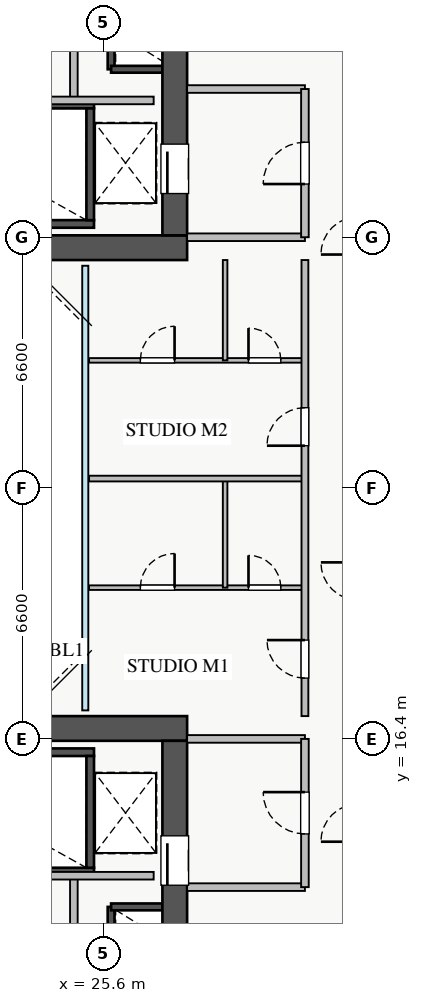
"""IFC4 building model, lengths in metres.
Left out: names, types, materials, properties, quantities, classifications, styles, units other than length and angle.
Written with IfcOpenShell. Run it as: python <this file> out.ifc"""

import sys

from ifc_helpers import new_model, si_unit, direction, frame, frame_2d, origin, place, context, subcontext, project, spatial, rectangle, extrude, source, transform, mapped, element, fill, save


model = new_model("IFC4")
c1 = context("Model", 3, precision=1e-05, world=origin(), true_north=direction((0.0, 1.0)))
c2 = subcontext(c1, "Body", "Model", "MODEL_VIEW")
j1 = project(units=[si_unit("LENGTHUNIT", "METRE"), si_unit("PLANEANGLEUNIT", "RADIAN")], contexts=[c1])
p1 = place(None, origin())
s1 = spatial("IfcSite", under=j1, at=p1, CompositionType="ELEMENT")
p2 = place(p1, origin())
s2 = spatial("IfcBuilding", under=s1, at=p2, CompositionType="ELEMENT")
p3 = place(p2, frame((0.0, 0.0, 110.0)))
s3 = spatial("IfcBuildingStorey", under=s2, at=p3, CompositionType="ELEMENT", Elevation=110.0)
p4 = place(p3, frame((25.8, 34.02, 0.0), z_axis=(0.0, 0.0, 1.0), x_axis=(0.0, 1.0, 0.0)))
e1 = element("IfcWall", 1, at=p4, inside=s3, PredefinedType="SHEAR", context=c2, shape_type="SweptSolid", body=[
    extrude(rectangle(XDim=1.06, YDim=0.18, at=frame_2d((0.53, 0.0))), origin(), (0.0, 0.0, 1.0), 3.07),
])
p5 = place(p3, frame((25.8, 34.02, 0.0), z_axis=(0.0, 0.0, 1.0), x_axis=(1.0, 0.0, 0.0)))
e2 = element("IfcWall", 2, at=p5, inside=s3, PredefinedType="SHEAR", context=c2, shape_type="SweptSolid", body=[
    extrude(rectangle(XDim=1.35, YDim=0.18, at=frame_2d((0.675, 0.0))), origin(), (0.0, 0.0, 1.0), 3.07),
])
p6 = place(p3, frame((25.8, 10.92, 0.0), z_axis=(0.0, 0.0, 1.0), x_axis=(0.0, 1.0, 0.0)))
e3 = element("IfcWall", 3, at=p6, inside=s3, PredefinedType="SHEAR", context=c2, shape_type="SweptSolid", body=[
    extrude(rectangle(XDim=1.06, YDim=0.18, at=frame_2d((0.53, 0.0))), origin(), (0.0, 0.0, 1.0), 3.07),
])
p7 = place(p3, frame((25.8, 11.98, 0.0), z_axis=(0.0, 0.0, 1.0), x_axis=(1.0, 0.0, 0.0)))
e4 = element("IfcWall", 4, at=p7, inside=s3, PredefinedType="SHEAR", context=c2, shape_type="SweptSolid", body=[
    extrude(rectangle(XDim=1.35, YDim=0.18, at=frame_2d((0.675, 0.0))), origin(), (0.0, 0.0, 1.0), 3.07),
])
p8 = place(p3, frame((18.2, 29.95, 0.0), z_axis=(0.0, 0.0, 1.0), x_axis=(1.0, 0.0, 0.0)))
e5 = element("IfcWall", 5, at=p8, inside=s3, PredefinedType="SHEAR", context=c2, shape_type="SweptSolid", body=[
    extrude(rectangle(XDim=7.15, YDim=0.2, at=frame_2d((3.575, 0.0))), origin(), (0.0, 0.0, 1.0), 3.25),
])
p9 = place(p3, frame((18.2, 33.09, 0.0), z_axis=(0.0, 0.0, 1.0), x_axis=(1.0, 0.0, 0.0)))
e6 = element("IfcWall", 6, at=p9, inside=s3, PredefinedType="SHEAR", context=c2, shape_type="SweptSolid", body=[
    extrude(rectangle(XDim=7.15, YDim=0.2, at=frame_2d((3.575, 0.0))), origin(), (0.0, 0.0, 1.0), 3.25),
])
p10 = place(p9, frame((0.35, 0.0, 0.0)))
e7 = element("IfcOpeningElement", 7, at=p10, cuts=e6, PredefinedType="OPENING", context=c2, shape_type="SweptSolid", body=[
    extrude(rectangle(XDim=1.1, YDim=2.05, at=frame_2d((0.55, 1.025))), frame((0.0, 0.11, 0.0), z_axis=(0.0, -1.0, 0.0), x_axis=(1.0, 0.0, 0.0)), (0.0, 0.0, 1.0), 0.22),
])
p11 = place(p3, frame((25.25, 30.05, 0.0), z_axis=(0.0, 0.0, 1.0), x_axis=(0.0, 1.0, 0.0)))
e8 = element("IfcWall", 8, at=p11, inside=s3, PredefinedType="SHEAR", context=c2, shape_type="SweptSolid", body=[
    extrude(rectangle(XDim=2.94, YDim=0.2, at=frame_2d((1.47, 0.0))), origin(), (0.0, 0.0, 1.0), 3.25),
])
p12 = place(p3, frame((18.2, 12.91, 0.0), z_axis=(0.0, 0.0, 1.0), x_axis=(1.0, 0.0, 0.0)))
e9 = element("IfcWall", 9, at=p12, inside=s3, PredefinedType="SHEAR", context=c2, shape_type="SweptSolid", body=[
    extrude(rectangle(XDim=7.15, YDim=0.2, at=frame_2d((3.575, 0.0))), origin(), (0.0, 0.0, 1.0), 3.25),
])
p13 = place(p12, frame((0.35, 0.0, 0.0)))
e10 = element("IfcOpeningElement", 10, at=p13, cuts=e9, PredefinedType="OPENING", context=c2, shape_type="SweptSolid", body=[
    extrude(rectangle(XDim=1.1, YDim=2.05, at=frame_2d((0.55, 1.025))), frame((0.0, 0.11, 0.0), z_axis=(0.0, -1.0, 0.0), x_axis=(1.0, 0.0, 0.0)), (0.0, 0.0, 1.0), 0.22),
])
p14 = place(p3, frame((18.2, 16.05, 0.0), z_axis=(0.0, 0.0, 1.0), x_axis=(1.0, 0.0, 0.0)))
e11 = element("IfcWall", 11, at=p14, inside=s3, PredefinedType="SHEAR", context=c2, shape_type="SweptSolid", body=[
    extrude(rectangle(XDim=7.15, YDim=0.2, at=frame_2d((3.575, 0.0))), origin(), (0.0, 0.0, 1.0), 3.25),
])
p15 = place(p3, frame((25.25, 13.01, 0.0), z_axis=(0.0, 0.0, 1.0), x_axis=(0.0, 1.0, 0.0)))
e12 = element("IfcWall", 12, at=p15, inside=s3, PredefinedType="SHEAR", context=c2, shape_type="SweptSolid", body=[
    extrude(rectangle(XDim=2.94, YDim=0.2, at=frame_2d((1.47, 0.0))), origin(), (0.0, 0.0, 1.0), 3.25),
])
p16 = place(p3, frame((10.2, 29.325, 0.0), z_axis=(0.0, 0.0, 1.0), x_axis=(1.0, 0.0, 0.0)))
e13 = element("IfcWall", 13, at=p16, inside=s3, PredefinedType="SHEAR", context=c2, shape_type="SweptSolid", body=[
    extrude(rectangle(XDim=17.6, YDim=0.65, at=frame_2d((8.8, 0.0))), origin(), (0.0, 0.0, 1.0), 3.25),
])
p17 = place(p3, frame((27.475, 29.65, 0.0), z_axis=(0.0, 0.0, 1.0), x_axis=(0.0, 1.0, 0.0)))
e14 = element("IfcWall", 14, at=p17, inside=s3, PredefinedType="SHEAR", context=c2, shape_type="SweptSolid", body=[
    extrude(rectangle(XDim=5.9, YDim=0.65, at=frame_2d((2.95, 0.0))), origin(), (0.0, 0.0, 1.0), 3.25),
])
p18 = place(p17, frame((1.1, 0.0, 0.0)))
e15 = element("IfcOpeningElement", 15, at=p18, cuts=e14, PredefinedType="OPENING", context=c2, shape_type="SweptSolid", body=[
    extrude(rectangle(XDim=1.3, YDim=2.05, at=frame_2d((0.65, 1.025))), frame((0.0, 0.335, 0.0), z_axis=(0.0, -1.0, 0.0), x_axis=(1.0, 0.0, 0.0)), (0.0, 0.0, 1.0), 0.67),
])
p19 = place(p3, frame((10.2, 16.675, 0.0), z_axis=(0.0, 0.0, 1.0), x_axis=(1.0, 0.0, 0.0)))
e16 = element("IfcWall", 16, at=p19, inside=s3, PredefinedType="SHEAR", context=c2, shape_type="SweptSolid", body=[
    extrude(rectangle(XDim=17.6, YDim=0.65, at=frame_2d((8.8, 0.0))), origin(), (0.0, 0.0, 1.0), 3.25),
])
p20 = place(p3, frame((27.475, 10.45, 0.0), z_axis=(0.0, 0.0, 1.0), x_axis=(0.0, 1.0, 0.0)))
e17 = element("IfcWall", 17, at=p20, inside=s3, PredefinedType="SHEAR", context=c2, shape_type="SweptSolid", body=[
    extrude(rectangle(XDim=5.9, YDim=0.65, at=frame_2d((2.95, 0.0))), origin(), (0.0, 0.0, 1.0), 3.25),
])
p21 = place(p20, frame((2.1, 0.0, 0.0)))
e18 = element("IfcOpeningElement", 18, at=p21, cuts=e17, PredefinedType="OPENING", context=c2, shape_type="SweptSolid", body=[
    extrude(rectangle(XDim=1.3, YDim=2.05, at=frame_2d((0.65, 1.025))), frame((0.0, 0.335, 0.0), z_axis=(0.0, -1.0, 0.0), x_axis=(1.0, 0.0, 0.0)), (0.0, 0.0, 1.0), 0.67),
])
for number, where, z_axis, x_axis in (
    (19, (27.8, 29.6, 0.0), (0.0, 0.0, 1.0), (1.0, 0.0, 0.0)),
    (20, (27.8, 33.5, 0.0), (0.0, 0.0, 1.0), (1.0, 0.0, 0.0)),
):
    element("IfcWall", number, at=place(p3, frame(where, z_axis=z_axis, x_axis=x_axis)), inside=s3, PredefinedType="PARTITIONING", context=c2, shape_type="SweptSolid", body=[
        extrude(rectangle(XDim=3.1, YDim=0.2, at=frame_2d((1.55, 0.0))), origin(), (0.0, 0.0, 1.0), 3.07),
    ])
p22 = place(p3, frame((30.9, 29.6, 0.0), z_axis=(0.0, 0.0, 1.0), x_axis=(0.0, 1.0, 0.0)))
e21 = element("IfcWall", 21, at=p22, inside=s3, PredefinedType="PARTITIONING", context=c2, shape_type="SweptSolid", body=[
    extrude(rectangle(XDim=3.9, YDim=0.2, at=frame_2d((1.95, 0.0))), origin(), (0.0, 0.0, 1.0), 3.07),
])
p23 = place(p22, frame((1.4, 0.0, 0.0)))
e22 = element("IfcOpeningElement", 22, at=p23, cuts=e21, PredefinedType="OPENING", context=c2, shape_type="SweptSolid", body=[
    extrude(rectangle(XDim=1.1, YDim=2.05, at=frame_2d((0.55, 1.025))), frame((0.0, 0.11, 0.0), z_axis=(0.0, -1.0, 0.0), x_axis=(1.0, 0.0, 0.0)), (0.0, 0.0, 1.0), 0.22),
])
for number, where, z_axis, x_axis in (
    (23, (27.8, 16.4, 0.0), (0.0, 0.0, 1.0), (1.0, 0.0, 0.0)),
    (24, (27.8, 12.5, 0.0), (0.0, 0.0, 1.0), (1.0, 0.0, 0.0)),
):
    element("IfcWall", number, at=place(p3, frame(where, z_axis=z_axis, x_axis=x_axis)), inside=s3, PredefinedType="PARTITIONING", context=c2, shape_type="SweptSolid", body=[
        extrude(rectangle(XDim=3.1, YDim=0.2, at=frame_2d((1.55, 0.0))), origin(), (0.0, 0.0, 1.0), 3.07),
    ])
p24 = place(p3, frame((30.9, 12.5, 0.0), z_axis=(0.0, 0.0, 1.0), x_axis=(0.0, 1.0, 0.0)))
e25 = element("IfcWall", 25, at=p24, inside=s3, PredefinedType="PARTITIONING", context=c2, shape_type="SweptSolid", body=[
    extrude(rectangle(XDim=3.9, YDim=0.2, at=frame_2d((1.95, 0.0))), origin(), (0.0, 0.0, 1.0), 3.07),
])
p25 = place(p24, frame((1.4, 0.0, 0.0)))
e26 = element("IfcOpeningElement", 26, at=p25, cuts=e25, PredefinedType="OPENING", context=c2, shape_type="SweptSolid", body=[
    extrude(rectangle(XDim=1.1, YDim=2.05, at=frame_2d((0.55, 1.025))), frame((0.0, 0.11, 0.0), z_axis=(0.0, -1.0, 0.0), x_axis=(1.0, 0.0, 0.0)), (0.0, 0.0, 1.0), 0.22),
])
for number, where, z_axis, x_axis in (
    (27, (24.82, 33.2, 0.0), (0.0, 0.0, 1.0), (0.0, 1.0, 0.0)),
    (28, (24.82, 10.15, 0.0), (0.0, 0.0, 1.0), (0.0, 1.0, 0.0)),
):
    element("IfcWall", number, at=place(p3, frame(where, z_axis=z_axis, x_axis=x_axis)), inside=s3, PredefinedType="PARTITIONING", context=c2, shape_type="SweptSolid", body=[
        extrude(rectangle(XDim=2.65, YDim=0.2, at=frame_2d((1.325, 0.0))), origin(), (0.0, 0.0, 1.0), 3.07),
    ])
for number, where, z_axis, x_axis in (
    (29, (21.75, 33.2, 0.0), (0.0, 0.0, 1.0), (1.0, 0.0, 0.0)),
    (30, (21.75, 12.8, 0.0), (0.0, 0.0, 1.0), (1.0, 0.0, 0.0)),
):
    element("IfcWall", number, at=place(p3, frame(where, z_axis=z_axis, x_axis=x_axis)), inside=s3, PredefinedType="PARTITIONING", context=c2, shape_type="SweptSolid", body=[
        extrude(rectangle(XDim=5.17, YDim=0.2, at=frame_2d((2.585, 0.0))), origin(), (0.0, 0.0, 1.0), 3.07),
    ])
p26 = place(p3, frame((25.22, 20.38, 0.0), z_axis=(0.0, 0.0, 1.0), x_axis=(1.0, 0.0, 0.0)))
e31 = element("IfcWall", 31, at=p26, inside=s3, PredefinedType="PLUMBINGWALL", context=c2, shape_type="SweptSolid", body=[
    extrude(rectangle(XDim=5.68, YDim=0.12, at=frame_2d((2.84, 0.0))), origin(), (0.0, 0.0, 1.0), 3.07),
])
p27 = place(p26, frame((1.35, 0.0, 0.0)))
e32 = element("IfcOpeningElement", 32, at=p27, cuts=e31, PredefinedType="OPENING", context=c2, shape_type="SweptSolid", body=[
    extrude(rectangle(XDim=0.9, YDim=2.05, at=frame_2d((0.45, 1.025))), frame((0.0, 0.07, 0.0), z_axis=(0.0, -1.0, 0.0), x_axis=(1.0, 0.0, 0.0)), (0.0, 0.0, 1.0), 0.14),
])
p28 = place(p26, frame((4.195, 0.0, 0.0)))
e33 = element("IfcOpeningElement", 33, at=p28, cuts=e31, PredefinedType="OPENING", context=c2, shape_type="SweptSolid", body=[
    extrude(rectangle(XDim=0.85, YDim=2.05, at=frame_2d((0.425, 1.025))), frame((0.0, 0.07, 0.0), z_axis=(0.0, -1.0, 0.0), x_axis=(1.0, 0.0, 0.0)), (0.0, 0.0, 1.0), 0.14),
])
p29 = place(p3, frame((28.8, 20.38, 0.0), z_axis=(0.0, 0.0, 1.0), x_axis=(0.0, 1.0, 0.0)))
e34 = element("IfcWall", 34, at=p29, inside=s3, PredefinedType="PLUMBINGWALL", context=c2, shape_type="SweptSolid", body=[
    extrude(rectangle(XDim=2.87, YDim=0.12, at=frame_2d((1.435, 0.0))), origin(), (0.0, 0.0, 1.0), 3.07),
])
p30 = place(p3, frame((25.22, 26.36, 0.0), z_axis=(0.0, 0.0, 1.0), x_axis=(1.0, 0.0, 0.0)))
e35 = element("IfcWall", 35, at=p30, inside=s3, PredefinedType="PLUMBINGWALL", context=c2, shape_type="SweptSolid", body=[
    extrude(rectangle(XDim=5.68, YDim=0.12, at=frame_2d((2.84, 0.0))), origin(), (0.0, 0.0, 1.0), 3.07),
])
p31 = place(p30, frame((1.35, 0.0, 0.0)))
e36 = element("IfcOpeningElement", 36, at=p31, cuts=e35, PredefinedType="OPENING", context=c2, shape_type="SweptSolid", body=[
    extrude(rectangle(XDim=0.9, YDim=2.05, at=frame_2d((0.45, 1.025))), frame((0.0, 0.07, 0.0), z_axis=(0.0, -1.0, 0.0), x_axis=(1.0, 0.0, 0.0)), (0.0, 0.0, 1.0), 0.14),
])
p32 = place(p30, frame((4.195, 0.0, 0.0)))
e37 = element("IfcOpeningElement", 37, at=p32, cuts=e35, PredefinedType="OPENING", context=c2, shape_type="SweptSolid", body=[
    extrude(rectangle(XDim=0.85, YDim=2.05, at=frame_2d((0.425, 1.025))), frame((0.0, 0.07, 0.0), z_axis=(0.0, -1.0, 0.0), x_axis=(1.0, 0.0, 0.0)), (0.0, 0.0, 1.0), 0.14),
])
p33 = place(p3, frame((28.8, 26.36, 0.0), z_axis=(0.0, 0.0, 1.0), x_axis=(0.0, 1.0, 0.0)))
e38 = element("IfcWall", 38, at=p33, inside=s3, PredefinedType="PLUMBINGWALL", context=c2, shape_type="SweptSolid", body=[
    extrude(rectangle(XDim=2.64, YDim=0.12, at=frame_2d((1.32, 0.0))), origin(), (0.0, 0.0, 1.0), 3.07),
])
p34 = place(p3, frame((25.22, 23.25, 0.0), z_axis=(0.0, 0.0, 1.0), x_axis=(1.0, 0.0, 0.0)))
e39 = element("IfcWall", 39, at=p34, inside=s3, PredefinedType="PARTITIONING", context=c2, shape_type="SweptSolid", body=[
    extrude(rectangle(XDim=5.68, YDim=0.15, at=frame_2d((2.84, 0.0))), origin(), (0.0, 0.0, 1.0), 3.07),
])
p35 = place(p3, frame((30.9, 17.0, 0.0), z_axis=(0.0, 0.0, 1.0), x_axis=(0.0, 1.0, 0.0)))
e40 = element("IfcWall", 40, at=p35, inside=s3, PredefinedType="PARTITIONING", context=c2, shape_type="SweptSolid", body=[
    extrude(rectangle(XDim=12.0, YDim=0.18, at=frame_2d((6.0, 0.0))), origin(), (0.0, 0.0, 1.0), 3.07),
])
p36 = place(p35, frame((1.0, 0.0, 0.0)))
e41 = element("IfcOpeningElement", 41, at=p36, cuts=e40, PredefinedType="OPENING", context=c2, shape_type="SweptSolid", body=[
    extrude(rectangle(XDim=1.0, YDim=2.05, at=frame_2d((0.5, 1.025))), frame((0.0, 0.1, 0.0), z_axis=(0.0, -1.0, 0.0), x_axis=(1.0, 0.0, 0.0)), (0.0, 0.0, 1.0), 0.2),
])
p37 = place(p35, frame((7.115, 0.0, 0.0)))
e42 = element("IfcOpeningElement", 42, at=p37, cuts=e40, PredefinedType="OPENING", context=c2, shape_type="SweptSolid", body=[
    extrude(rectangle(XDim=1.0, YDim=2.05, at=frame_2d((0.5, 1.025))), frame((0.0, 0.1, 0.0), z_axis=(0.0, -1.0, 0.0), x_axis=(1.0, 0.0, 0.0)), (0.0, 0.0, 1.0), 0.2),
])
m1 = source(origin(), c2, "Body", "SweptSolid", [
    extrude(rectangle(XDim=1.3, YDim=2.05, at=frame_2d((0.65, 1.025))), frame((0.0, 0.025, 0.0), z_axis=(0.0, -1.0, 0.0), x_axis=(1.0, 0.0, 0.0)), (0.0, 0.0, 1.0), 0.05),
])
p38 = place(p18, origin())
e43 = element("IfcDoor", 43, at=p38, inside=s3, OperationType="SLIDING_TO_LEFT", PredefinedType="DOOR", context=c2, shape_type="MappedRepresentation", body=[
    mapped(m1, transform((0.0, 0.0, 0.0), x_axis=(1.0, 0.0, 0.0), y_axis=(0.0, 1.0, 0.0), z_axis=(0.0, 0.0, 1.0), scale=1.0)),
])
fill(e15, e43)
p39 = place(p21, origin())
e44 = element("IfcDoor", 44, at=p39, inside=s3, OperationType="SLIDING_TO_RIGHT", PredefinedType="DOOR", context=c2, shape_type="MappedRepresentation", body=[
    mapped(m1, transform((0.0, 0.0, 0.0), x_axis=(1.0, 0.0, 0.0), y_axis=(0.0, 1.0, 0.0), z_axis=(0.0, 0.0, 1.0), scale=1.0)),
])
fill(e18, e44)
m2 = source(origin(), c2, "Body", "SweptSolid", [
    extrude(rectangle(XDim=1.1, YDim=2.05, at=frame_2d((0.55, 1.025))), frame((0.0, 0.025, 0.0), z_axis=(0.0, -1.0, 0.0), x_axis=(1.0, 0.0, 0.0)), (0.0, 0.0, 1.0), 0.05),
])
p40 = place(p23, origin())
e45 = element("IfcDoor", 45, at=p40, inside=s3, OperationType="SINGLE_SWING_LEFT", PredefinedType="DOOR", context=c2, shape_type="MappedRepresentation", body=[
    mapped(m2, transform((0.0, 0.0, 0.0), x_axis=(1.0, 0.0, 0.0), y_axis=(0.0, 1.0, 0.0), z_axis=(0.0, 0.0, 1.0), scale=1.0)),
])
fill(e22, e45)
p41 = place(p25, origin())
e46 = element("IfcDoor", 46, at=p41, inside=s3, OperationType="SINGLE_SWING_RIGHT", PredefinedType="DOOR", context=c2, shape_type="MappedRepresentation", body=[
    mapped(m2, transform((0.0, 0.0, 0.0), x_axis=(1.0, 0.0, 0.0), y_axis=(0.0, 1.0, 0.0), z_axis=(0.0, 0.0, 1.0), scale=1.0)),
])
fill(e26, e46)
m3 = source(origin(), c2, "Body", "SweptSolid", [
    extrude(rectangle(XDim=0.9, YDim=2.05, at=frame_2d((0.45, 1.025))), frame((0.0, 0.025, 0.0), z_axis=(0.0, -1.0, 0.0), x_axis=(1.0, 0.0, 0.0)), (0.0, 0.0, 1.0), 0.05),
])
p42 = place(p27, origin())
e47 = element("IfcDoor", 47, at=p42, inside=s3, OperationType="SINGLE_SWING_RIGHT", PredefinedType="DOOR", context=c2, shape_type="MappedRepresentation", body=[
    mapped(m3, transform((0.0, 0.0, 0.0), x_axis=(1.0, 0.0, 0.0), y_axis=(0.0, 1.0, 0.0), z_axis=(0.0, 0.0, 1.0), scale=1.0)),
])
fill(e32, e47)
m4 = source(origin(), c2, "Body", "SweptSolid", [
    extrude(rectangle(XDim=0.85, YDim=2.05, at=frame_2d((0.425, 1.025))), frame((0.0, 0.025, 0.0), z_axis=(0.0, -1.0, 0.0), x_axis=(1.0, 0.0, 0.0)), (0.0, 0.0, 1.0), 0.05),
])
p43 = place(p28, origin())
e48 = element("IfcDoor", 48, at=p43, inside=s3, OperationType="SINGLE_SWING_LEFT", PredefinedType="DOOR", context=c2, shape_type="MappedRepresentation", body=[
    mapped(m4, transform((0.0, 0.0, 0.0), x_axis=(1.0, 0.0, 0.0), y_axis=(0.0, 1.0, 0.0), z_axis=(0.0, 0.0, 1.0), scale=1.0)),
])
fill(e33, e48)
p44 = place(p31, origin())
e49 = element("IfcDoor", 49, at=p44, inside=s3, OperationType="SINGLE_SWING_RIGHT", PredefinedType="DOOR", context=c2, shape_type="MappedRepresentation", body=[
    mapped(m3, transform((0.0, 0.0, 0.0), x_axis=(1.0, 0.0, 0.0), y_axis=(0.0, 1.0, 0.0), z_axis=(0.0, 0.0, 1.0), scale=1.0)),
])
fill(e36, e49)
p45 = place(p32, origin())
e50 = element("IfcDoor", 50, at=p45, inside=s3, OperationType="SINGLE_SWING_LEFT", PredefinedType="DOOR", context=c2, shape_type="MappedRepresentation", body=[
    mapped(m4, transform((0.0, 0.0, 0.0), x_axis=(1.0, 0.0, 0.0), y_axis=(0.0, 1.0, 0.0), z_axis=(0.0, 0.0, 1.0), scale=1.0)),
])
fill(e37, e50)
m5 = source(origin(), c2, "Body", "SweptSolid", [
    extrude(rectangle(XDim=1.0, YDim=2.05, at=frame_2d((0.5, 1.025))), frame((0.0, 0.025, 0.0), z_axis=(0.0, -1.0, 0.0), x_axis=(1.0, 0.0, 0.0)), (0.0, 0.0, 1.0), 0.05),
])
p46 = place(p36, origin())
e51 = element("IfcDoor", 51, at=p46, inside=s3, OperationType="SINGLE_SWING_RIGHT", PredefinedType="DOOR", context=c2, shape_type="MappedRepresentation", body=[
    mapped(m5, transform((0.0, 0.0, 0.0), x_axis=(1.0, 0.0, 0.0), y_axis=(0.0, 1.0, 0.0), z_axis=(0.0, 0.0, 1.0), scale=1.0)),
])
fill(e41, e51)
p47 = place(p37, origin())
e52 = element("IfcDoor", 52, at=p47, inside=s3, OperationType="SINGLE_SWING_LEFT", PredefinedType="DOOR", context=c2, shape_type="MappedRepresentation", body=[
    mapped(m5, transform((0.0, 0.0, 0.0), x_axis=(1.0, 0.0, 0.0), y_axis=(0.0, 1.0, 0.0), z_axis=(0.0, 0.0, 1.0), scale=1.0)),
])
fill(e42, e52)
save(model, sys.argv[1])
